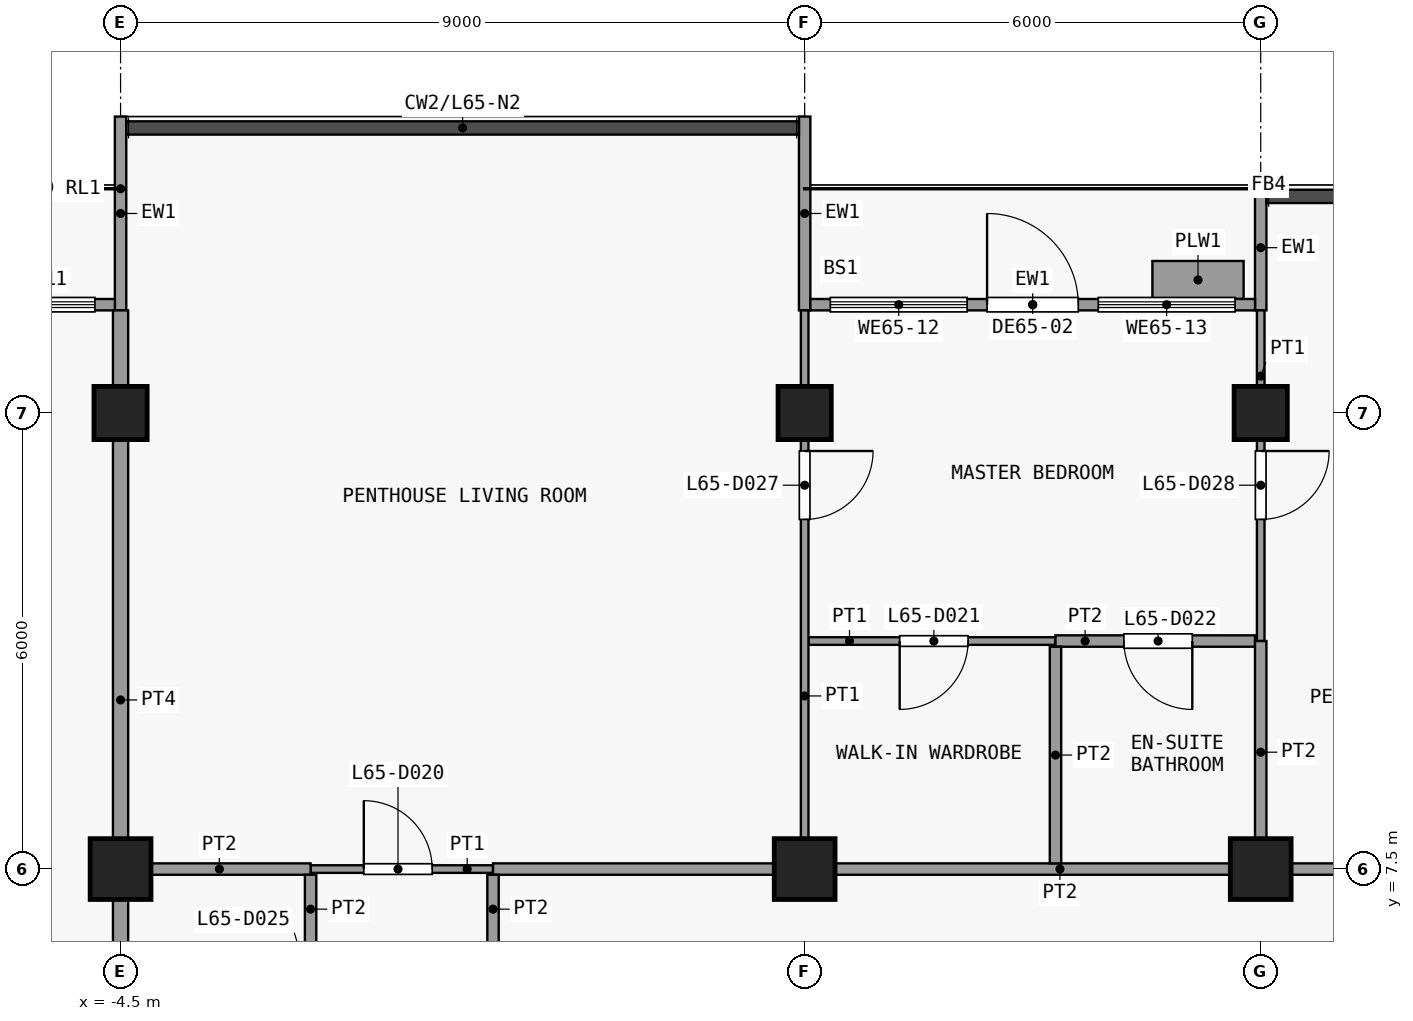
"""IFC4 building model, lengths in metres.
Left out: names, types, materials, properties, quantities, classifications, styles, units other than length and angle.
Written with IfcOpenShell. Run it as: python <this file> out.ifc"""

import sys

from ifc_helpers import new_model, si_unit, direction, frame, frame_2d, origin, origin_2d, place, context, subcontext, project, spatial, rectangle, extrude, element, fill, save


model = new_model("IFC4")
c1 = context("Model", 3, precision=1e-05, world=origin(), true_north=direction((0.0, 1.0)))
c2 = subcontext(c1, "Body", "Model", "MODEL_VIEW")
j1 = project(units=[si_unit("LENGTHUNIT", "METRE"), si_unit("PLANEANGLEUNIT", "RADIAN")], contexts=[c1])
p1 = place(None, origin())
s1 = spatial("IfcSite", under=j1, at=p1, CompositionType="ELEMENT")
p2 = place(p1, origin())
s2 = spatial("IfcBuilding", under=s1, at=p2, CompositionType="ELEMENT")
p3 = place(p2, frame((0.0, 0.0, 259.1)))
s3 = spatial("IfcBuildingStorey", under=s2, at=p3, CompositionType="ELEMENT", Elevation=259.1)
p4 = place(p3, frame((-4.5, 7.5, 0.0), z_axis=(0.0, 0.0, 1.0), x_axis=(1.0, 0.0, 0.0)))
e1 = element("IfcColumn", 1, at=p4, inside=s3, PredefinedType="COLUMN", context=c2, shape_type="SweptSolid", body=[
    extrude(rectangle(XDim=0.8, YDim=0.8, at=origin_2d()), origin(), (0.0, 0.0, 1.0), 3.6),
])
p5 = place(p3, frame((-4.5, 13.5, 0.0), z_axis=(0.0, 0.0, 1.0), x_axis=(1.0, 0.0, 0.0)))
e2 = element("IfcColumn", 2, at=p5, inside=s3, PredefinedType="COLUMN", context=c2, shape_type="SweptSolid", body=[
    extrude(rectangle(XDim=0.7, YDim=0.7, at=origin_2d()), origin(), (0.0, 0.0, 1.0), 3.6),
])
p6 = place(p3, frame((4.5, 7.5, 0.0), z_axis=(0.0, 0.0, 1.0), x_axis=(1.0, 0.0, 0.0)))
e3 = element("IfcColumn", 3, at=p6, inside=s3, PredefinedType="COLUMN", context=c2, shape_type="SweptSolid", body=[
    extrude(rectangle(XDim=0.8, YDim=0.8, at=origin_2d()), origin(), (0.0, 0.0, 1.0), 3.6),
])
p7 = place(p3, frame((4.5, 13.5, 0.0), z_axis=(0.0, 0.0, 1.0), x_axis=(1.0, 0.0, 0.0)))
e4 = element("IfcColumn", 4, at=p7, inside=s3, PredefinedType="COLUMN", context=c2, shape_type="SweptSolid", body=[
    extrude(rectangle(XDim=0.7, YDim=0.7, at=origin_2d()), origin(), (0.0, 0.0, 1.0), 3.6),
])
p8 = place(p3, frame((10.5, 7.5, 0.0), z_axis=(0.0, 0.0, 1.0), x_axis=(1.0, 0.0, 0.0)))
e5 = element("IfcColumn", 5, at=p8, inside=s3, PredefinedType="COLUMN", context=c2, shape_type="SweptSolid", body=[
    extrude(rectangle(XDim=0.8, YDim=0.8, at=origin_2d()), origin(), (0.0, 0.0, 1.0), 3.6),
])
p9 = place(p3, frame((10.5, 13.5, 0.0), z_axis=(0.0, 0.0, 1.0), x_axis=(1.0, 0.0, 0.0)))
e6 = element("IfcColumn", 6, at=p9, inside=s3, PredefinedType="COLUMN", context=c2, shape_type="SweptSolid", body=[
    extrude(rectangle(XDim=0.7, YDim=0.7, at=origin_2d()), origin(), (0.0, 0.0, 1.0), 3.6),
])
p10 = place(p3, frame((-4.5, 14.85, 0.0), z_axis=(0.0, 0.0, 1.0), x_axis=(0.0, 1.0, 0.0)))
e7 = element("IfcWall", 7, at=p10, inside=s3, PredefinedType="SOLIDWALL", context=c2, shape_type="SweptSolid", body=[
    extrude(rectangle(XDim=2.55, YDim=0.15, at=frame_2d((1.275, 0.0))), origin(), (0.0, 0.0, 1.0), 3.3),
])
p11 = place(p3, frame((-10.425, 14.925, 0.0), z_axis=(0.0, 0.0, 1.0), x_axis=(1.0, 0.0, 0.0)))
e8 = element("IfcWall", 8, at=p11, inside=s3, PredefinedType="SOLIDWALL", context=c2, shape_type="SweptSolid", body=[
    extrude(rectangle(XDim=5.85, YDim=0.15, at=frame_2d((2.925, 0.0))), origin(), (0.0, 0.0, 1.0), 3.3),
])
p12 = place(p11, frame((2.325, 0.0, 0.0)))
e9 = element("IfcOpeningElement", 9, at=p12, cuts=e8, PredefinedType="OPENING", context=c2, shape_type="SweptSolid", body=[
    extrude(rectangle(XDim=1.2, YDim=2.4, at=frame_2d((0.6, 1.2))), frame((0.0, 0.085, 0.0), z_axis=(0.0, -1.0, 0.0), x_axis=(1.0, 0.0, 0.0)), (0.0, 0.0, 1.0), 0.17),
])
p13 = place(p11, frame((0.262, 0.0, 0.9)))
e10 = element("IfcOpeningElement", 10, at=p13, cuts=e8, PredefinedType="OPENING", context=c2, shape_type="SweptSolid", body=[
    extrude(rectangle(XDim=1.8, YDim=2.1, at=frame_2d((0.9, 1.05))), frame((0.0, 0.085, 0.0), z_axis=(0.0, -1.0, 0.0), x_axis=(1.0, 0.0, 0.0)), (0.0, 0.0, 1.0), 0.17),
])
p14 = place(p11, frame((3.788, 0.0, 0.9)))
e11 = element("IfcOpeningElement", 11, at=p14, cuts=e8, PredefinedType="OPENING", context=c2, shape_type="SweptSolid", body=[
    extrude(rectangle(XDim=1.8, YDim=2.1, at=frame_2d((0.9, 1.05))), frame((0.0, 0.085, 0.0), z_axis=(0.0, -1.0, 0.0), x_axis=(1.0, 0.0, 0.0)), (0.0, 0.0, 1.0), 0.17),
])
p15 = place(p3, frame((4.5, 14.85, 0.0), z_axis=(0.0, 0.0, 1.0), x_axis=(0.0, 1.0, 0.0)))
e12 = element("IfcWall", 12, at=p15, inside=s3, PredefinedType="SOLIDWALL", context=c2, shape_type="SweptSolid", body=[
    extrude(rectangle(XDim=2.55, YDim=0.15, at=frame_2d((1.275, 0.0))), origin(), (0.0, 0.0, 1.0), 3.3),
])
p16 = place(p3, frame((10.5, 14.85, 0.0), z_axis=(0.0, 0.0, 1.0), x_axis=(0.0, 1.0, 0.0)))
e13 = element("IfcWall", 13, at=p16, inside=s3, PredefinedType="SOLIDWALL", context=c2, shape_type="SweptSolid", body=[
    extrude(rectangle(XDim=1.65, YDim=0.15, at=frame_2d((0.825, 0.0))), origin(), (0.0, 0.0, 1.0), 3.3),
])
p17 = place(p3, frame((4.575, 14.925, 0.0), z_axis=(0.0, 0.0, 1.0), x_axis=(1.0, 0.0, 0.0)))
e14 = element("IfcWall", 14, at=p17, inside=s3, PredefinedType="SOLIDWALL", context=c2, shape_type="SweptSolid", body=[
    extrude(rectangle(XDim=5.85, YDim=0.15, at=frame_2d((2.925, 0.0))), origin(), (0.0, 0.0, 1.0), 3.3),
])
p18 = place(p17, frame((2.325, 0.0, 0.0)))
e15 = element("IfcOpeningElement", 15, at=p18, cuts=e14, PredefinedType="OPENING", context=c2, shape_type="SweptSolid", body=[
    extrude(rectangle(XDim=1.2, YDim=2.4, at=frame_2d((0.6, 1.2))), frame((0.0, 0.085, 0.0), z_axis=(0.0, -1.0, 0.0), x_axis=(1.0, 0.0, 0.0)), (0.0, 0.0, 1.0), 0.17),
])
p19 = place(p17, frame((0.262, 0.0, 0.9)))
e16 = element("IfcOpeningElement", 16, at=p19, cuts=e14, PredefinedType="OPENING", context=c2, shape_type="SweptSolid", body=[
    extrude(rectangle(XDim=1.8, YDim=2.1, at=frame_2d((0.9, 1.05))), frame((0.0, 0.085, 0.0), z_axis=(0.0, -1.0, 0.0), x_axis=(1.0, 0.0, 0.0)), (0.0, 0.0, 1.0), 0.17),
])
p20 = place(p17, frame((3.788, 0.0, 0.9)))
e17 = element("IfcOpeningElement", 17, at=p20, cuts=e14, PredefinedType="OPENING", context=c2, shape_type="SweptSolid", body=[
    extrude(rectangle(XDim=1.8, YDim=2.1, at=frame_2d((0.9, 1.05))), frame((0.0, 0.085, 0.0), z_axis=(0.0, -1.0, 0.0), x_axis=(1.0, 0.0, 0.0)), (0.0, 0.0, 1.0), 0.17),
])
p21 = place(p3, frame((9.075, 15.25, 0.0), z_axis=(0.0, 0.0, 1.0), x_axis=(1.0, 0.0, 0.0)))
e18 = element("IfcWall", 18, at=p21, inside=s3, PredefinedType="USERDEFINED", context=c2, shape_type="SweptSolid", body=[
    extrude(rectangle(XDim=1.2, YDim=0.5, at=frame_2d((0.6, 0.0))), origin(), (0.0, 0.0, 1.0), 0.9),
])
p22 = place(p3, frame((-2.0, 7.5, 0.0), z_axis=(0.0, 0.0, 1.0), x_axis=(1.0, 0.0, 0.0)))
e19 = element("IfcWall", 19, at=p22, inside=s3, PredefinedType="PARTITIONING", context=c2, shape_type="SweptSolid", body=[
    extrude(rectangle(XDim=2.4, YDim=0.1, at=frame_2d((1.2, 0.0))), origin(), (0.0, 0.0, 1.0), 3.3),
])
p23 = place(p22, frame((0.7, 0.0, 0.0)))
e20 = element("IfcOpeningElement", 20, at=p23, cuts=e19, PredefinedType="OPENING", context=c2, shape_type="SweptSolid", body=[
    extrude(rectangle(XDim=0.9, YDim=2.1, at=frame_2d((0.45, 1.05))), frame((0.0, 0.06, 0.0), z_axis=(0.0, -1.0, 0.0), x_axis=(1.0, 0.0, 0.0)), (0.0, 0.0, 1.0), 0.12),
])
p24 = place(p3, frame((-4.4, 7.5, 0.0), z_axis=(0.0, 0.0, 1.0), x_axis=(1.0, 0.0, 0.0)))
e21 = element("IfcWall", 21, at=p24, inside=s3, PredefinedType="PARTITIONING", context=c2, shape_type="SweptSolid", body=[
    extrude(rectangle(XDim=2.4, YDim=0.15, at=frame_2d((1.2, 0.0))), origin(), (0.0, 0.0, 1.0), 3.3),
])
p25 = place(p3, frame((0.4, 7.5, 0.0), z_axis=(0.0, 0.0, 1.0), x_axis=(1.0, 0.0, 0.0)))
e22 = element("IfcWall", 22, at=p25, inside=s3, PredefinedType="PARTITIONING", context=c2, shape_type="SweptSolid", body=[
    extrude(rectangle(XDim=14.917, YDim=0.15, at=frame_2d((7.458, 0.0))), origin(), (0.0, 0.0, 1.0), 3.3),
])
p26 = place(p3, frame((4.55, 10.5, 0.0), z_axis=(0.0, 0.0, 1.0), x_axis=(1.0, 0.0, 0.0)))
e23 = element("IfcWall", 23, at=p26, inside=s3, PredefinedType="PARTITIONING", context=c2, shape_type="SweptSolid", body=[
    extrude(rectangle(XDim=3.25, YDim=0.1, at=frame_2d((1.625, 0.0))), origin(), (0.0, 0.0, 1.0), 3.3),
])
p27 = place(p26, frame((1.2, 0.0, 0.0)))
e24 = element("IfcOpeningElement", 24, at=p27, cuts=e23, PredefinedType="OPENING", context=c2, shape_type="SweptSolid", body=[
    extrude(rectangle(XDim=0.9, YDim=2.1, at=frame_2d((0.45, 1.05))), frame((0.0, 0.06, 0.0), z_axis=(0.0, -1.0, 0.0), x_axis=(1.0, 0.0, 0.0)), (0.0, 0.0, 1.0), 0.12),
])
p28 = place(p3, frame((7.8, 10.5, 0.0), z_axis=(0.0, 0.0, 1.0), x_axis=(1.0, 0.0, 0.0)))
e25 = element("IfcWall", 25, at=p28, inside=s3, PredefinedType="PARTITIONING", context=c2, shape_type="SweptSolid", body=[
    extrude(rectangle(XDim=2.625, YDim=0.15, at=frame_2d((1.312, 0.0))), origin(), (0.0, 0.0, 1.0), 3.3),
])
p29 = place(p28, frame((0.9, 0.0, 0.0)))
e26 = element("IfcOpeningElement", 26, at=p29, cuts=e25, PredefinedType="OPENING", context=c2, shape_type="SweptSolid", body=[
    extrude(rectangle(XDim=0.9, YDim=2.1, at=frame_2d((0.45, 1.05))), frame((0.0, 0.085, 0.0), z_axis=(0.0, -1.0, 0.0), x_axis=(1.0, 0.0, 0.0)), (0.0, 0.0, 1.0), 0.17),
])
p30 = place(p3, frame((-4.5, 4.6, 0.0), z_axis=(0.0, 0.0, 1.0), x_axis=(0.0, 1.0, 0.0)))
e27 = element("IfcWall", 27, at=p30, inside=s3, PredefinedType="PARTITIONING", context=c2, shape_type="SweptSolid", body=[
    extrude(rectangle(XDim=10.25, YDim=0.2, at=frame_2d((5.125, 0.0))), origin(), (0.0, 0.0, 1.0), 3.3),
])
p31 = place(p3, frame((-2.0, 4.6, 0.0), z_axis=(0.0, 0.0, 1.0), x_axis=(0.0, 1.0, 0.0)))
e28 = element("IfcWall", 28, at=p31, inside=s3, PredefinedType="PARTITIONING", context=c2, shape_type="SweptSolid", body=[
    extrude(rectangle(XDim=2.825, YDim=0.15, at=frame_2d((1.413, 0.0))), origin(), (0.0, 0.0, 1.0), 3.3),
])
p32 = place(p31, frame((0.9, 0.0, 0.0)))
e29 = element("IfcOpeningElement", 29, at=p32, cuts=e28, PredefinedType="OPENING", context=c2, shape_type="SweptSolid", body=[
    extrude(rectangle(XDim=0.9, YDim=2.1, at=frame_2d((0.45, 1.05))), frame((0.0, 0.085, 0.0), z_axis=(0.0, -1.0, 0.0), x_axis=(1.0, 0.0, 0.0)), (0.0, 0.0, 1.0), 0.17),
])
p33 = place(p3, frame((0.4, 4.6, 0.0), z_axis=(0.0, 0.0, 1.0), x_axis=(0.0, 1.0, 0.0)))
e30 = element("IfcWall", 30, at=p33, inside=s3, PredefinedType="PARTITIONING", context=c2, shape_type="SweptSolid", body=[
    extrude(rectangle(XDim=2.825, YDim=0.15, at=frame_2d((1.413, 0.0))), origin(), (0.0, 0.0, 1.0), 3.3),
])
p34 = place(p33, frame((0.9, 0.0, 0.0)))
e31 = element("IfcOpeningElement", 31, at=p34, cuts=e30, PredefinedType="OPENING", context=c2, shape_type="SweptSolid", body=[
    extrude(rectangle(XDim=0.9, YDim=2.1, at=frame_2d((0.45, 1.05))), frame((0.0, 0.085, 0.0), z_axis=(0.0, -1.0, 0.0), x_axis=(1.0, 0.0, 0.0)), (0.0, 0.0, 1.0), 0.17),
])
p35 = place(p3, frame((4.5, 7.575, 0.0), z_axis=(0.0, 0.0, 1.0), x_axis=(0.0, 1.0, 0.0)))
e32 = element("IfcWall", 32, at=p35, inside=s3, PredefinedType="PARTITIONING", context=c2, shape_type="SweptSolid", body=[
    extrude(rectangle(XDim=7.275, YDim=0.1, at=frame_2d((3.638, 0.0))), origin(), (0.0, 0.0, 1.0), 3.3),
])
p36 = place(p35, frame((4.525, 0.0, 0.0)))
e33 = element("IfcOpeningElement", 33, at=p36, cuts=e32, PredefinedType="OPENING", context=c2, shape_type="SweptSolid", body=[
    extrude(rectangle(XDim=0.9, YDim=2.1, at=frame_2d((0.45, 1.05))), frame((0.0, 0.06, 0.0), z_axis=(0.0, -1.0, 0.0), x_axis=(1.0, 0.0, 0.0)), (0.0, 0.0, 1.0), 0.12),
])
p37 = place(p3, frame((7.8, 7.575, 0.0), z_axis=(0.0, 0.0, 1.0), x_axis=(0.0, 1.0, 0.0)))
e34 = element("IfcWall", 34, at=p37, inside=s3, PredefinedType="PARTITIONING", context=c2, shape_type="SweptSolid", body=[
    extrude(rectangle(XDim=2.85, YDim=0.15, at=frame_2d((1.425, 0.0))), origin(), (0.0, 0.0, 1.0), 3.3),
])
p38 = place(p3, frame((10.5, 10.5, 0.0), z_axis=(0.0, 0.0, 1.0), x_axis=(0.0, 1.0, 0.0)))
e35 = element("IfcWall", 35, at=p38, inside=s3, PredefinedType="PARTITIONING", context=c2, shape_type="SweptSolid", body=[
    extrude(rectangle(XDim=4.35, YDim=0.1, at=frame_2d((2.175, 0.0))), origin(), (0.0, 0.0, 1.0), 3.3),
])
p39 = place(p38, frame((1.6, 0.0, 0.0)))
e36 = element("IfcOpeningElement", 36, at=p39, cuts=e35, PredefinedType="OPENING", context=c2, shape_type="SweptSolid", body=[
    extrude(rectangle(XDim=0.9, YDim=2.1, at=frame_2d((0.45, 1.05))), frame((0.0, 0.06, 0.0), z_axis=(0.0, -1.0, 0.0), x_axis=(1.0, 0.0, 0.0)), (0.0, 0.0, 1.0), 0.12),
])
p40 = place(p3, frame((10.5, 7.575, 0.0), z_axis=(0.0, 0.0, 1.0), x_axis=(0.0, 1.0, 0.0)))
e37 = element("IfcWall", 37, at=p40, inside=s3, PredefinedType="PARTITIONING", context=c2, shape_type="SweptSolid", body=[
    extrude(rectangle(XDim=2.925, YDim=0.15, at=frame_2d((1.462, 0.0))), origin(), (0.0, 0.0, 1.0), 3.3),
])
p41 = place(p14, origin())
e38 = element("IfcWindow", 38, at=p41, inside=s3, PartitioningType="SINGLE_PANEL", PredefinedType="WINDOW", context=c2, shape_type="SweptSolid", body=[
    extrude(rectangle(XDim=1.8, YDim=2.1, at=frame_2d((0.9, 1.05))), frame((0.0, 0.03, 0.0), z_axis=(0.0, -1.0, 0.0), x_axis=(1.0, 0.0, 0.0)), (0.0, 0.0, 1.0), 0.06),
])
fill(e11, e38)
p42 = place(p18, origin())
e39 = element("IfcDoor", 39, at=p42, inside=s3, OperationType="SINGLE_SWING_LEFT", PredefinedType="DOOR", context=c2, shape_type="SweptSolid", body=[
    extrude(rectangle(XDim=1.2, YDim=2.4, at=frame_2d((0.6, 1.2))), frame((0.0, 0.025, 0.0), z_axis=(0.0, -1.0, 0.0), x_axis=(1.0, 0.0, 0.0)), (0.0, 0.0, 1.0), 0.05),
])
fill(e15, e39)
p43 = place(p19, origin())
e40 = element("IfcWindow", 40, at=p43, inside=s3, PartitioningType="SINGLE_PANEL", PredefinedType="WINDOW", context=c2, shape_type="SweptSolid", body=[
    extrude(rectangle(XDim=1.8, YDim=2.1, at=frame_2d((0.9, 1.05))), frame((0.0, 0.03, 0.0), z_axis=(0.0, -1.0, 0.0), x_axis=(1.0, 0.0, 0.0)), (0.0, 0.0, 1.0), 0.06),
])
fill(e16, e40)
p44 = place(p20, origin())
e41 = element("IfcWindow", 41, at=p44, inside=s3, PartitioningType="SINGLE_PANEL", PredefinedType="WINDOW", context=c2, shape_type="SweptSolid", body=[
    extrude(rectangle(XDim=1.8, YDim=2.1, at=frame_2d((0.9, 1.05))), frame((0.0, 0.03, 0.0), z_axis=(0.0, -1.0, 0.0), x_axis=(1.0, 0.0, 0.0)), (0.0, 0.0, 1.0), 0.06),
])
fill(e17, e41)
p45 = place(p23, origin())
e42 = element("IfcDoor", 42, at=p45, inside=s3, OperationType="SINGLE_SWING_RIGHT", PredefinedType="DOOR", context=c2, shape_type="SweptSolid", body=[
    extrude(rectangle(XDim=0.9, YDim=2.1, at=frame_2d((0.45, 1.05))), frame((0.0, 0.025, 0.0), z_axis=(0.0, -1.0, 0.0), x_axis=(1.0, 0.0, 0.0)), (0.0, 0.0, 1.0), 0.05),
])
fill(e20, e42)
p46 = place(p27, origin())
e43 = element("IfcDoor", 43, at=p46, inside=s3, OperationType="SINGLE_SWING_LEFT", PredefinedType="DOOR", context=c2, shape_type="SweptSolid", body=[
    extrude(rectangle(XDim=0.9, YDim=2.1, at=frame_2d((0.45, 1.05))), frame((0.0, 0.025, 0.0), z_axis=(0.0, -1.0, 0.0), x_axis=(1.0, 0.0, 0.0)), (0.0, 0.0, 1.0), 0.05),
])
fill(e24, e43)
p47 = place(p29, origin())
e44 = element("IfcDoor", 44, at=p47, inside=s3, OperationType="SINGLE_SWING_RIGHT", PredefinedType="DOOR", context=c2, shape_type="SweptSolid", body=[
    extrude(rectangle(XDim=0.9, YDim=2.1, at=frame_2d((0.45, 1.05))), frame((0.0, 0.025, 0.0), z_axis=(0.0, -1.0, 0.0), x_axis=(1.0, 0.0, 0.0)), (0.0, 0.0, 1.0), 0.05),
])
fill(e26, e44)
p48 = place(p36, origin())
e45 = element("IfcDoor", 45, at=p48, inside=s3, OperationType="SINGLE_SWING_RIGHT", PredefinedType="DOOR", context=c2, shape_type="SweptSolid", body=[
    extrude(rectangle(XDim=0.9, YDim=2.1, at=frame_2d((0.45, 1.05))), frame((0.0, 0.025, 0.0), z_axis=(0.0, -1.0, 0.0), x_axis=(1.0, 0.0, 0.0)), (0.0, 0.0, 1.0), 0.05),
])
fill(e33, e45)
p49 = place(p39, origin())
e46 = element("IfcDoor", 46, at=p49, inside=s3, OperationType="SINGLE_SWING_RIGHT", PredefinedType="DOOR", context=c2, shape_type="SweptSolid", body=[
    extrude(rectangle(XDim=0.9, YDim=2.1, at=frame_2d((0.45, 1.05))), frame((0.0, 0.025, 0.0), z_axis=(0.0, -1.0, 0.0), x_axis=(1.0, 0.0, 0.0)), (0.0, 0.0, 1.0), 0.05),
])
fill(e36, e46)
save(model, sys.argv[1])
